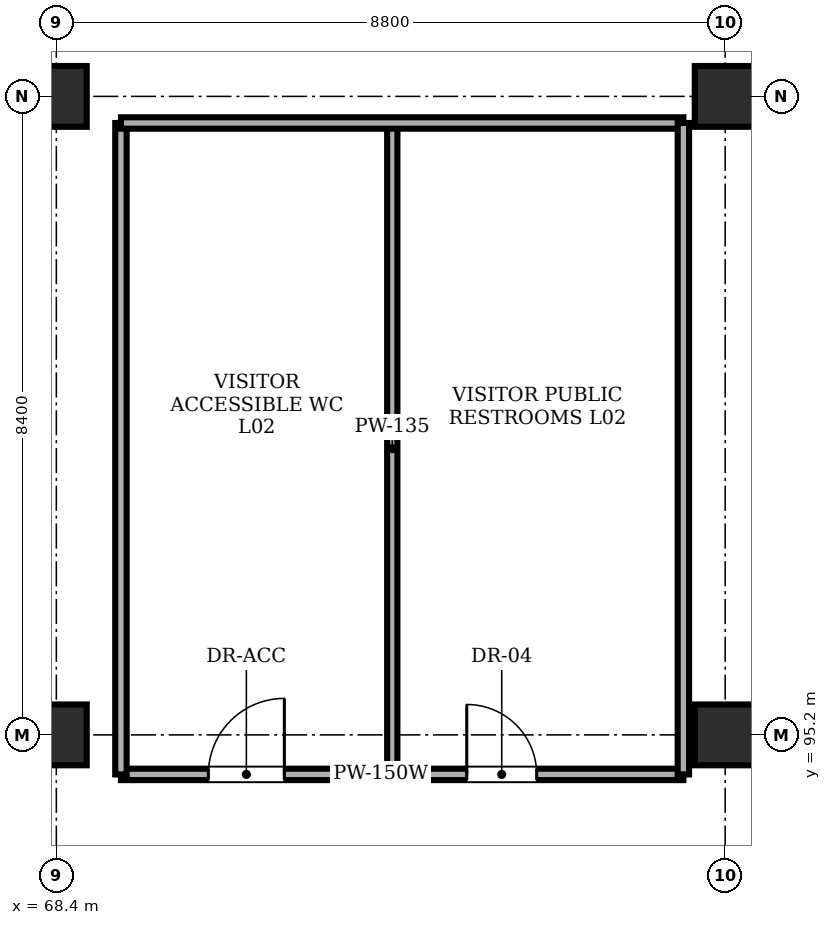
"""IFC4 building model, lengths in metres.
Left out: names, types, materials, properties, quantities, classifications, styles, units other than length and angle.
Written with IfcOpenShell. Run it as: python <this file> out.ifc"""

import sys

from ifc_helpers import new_model, si_unit, direction, frame, frame_2d, origin, origin_2d, place, context, subcontext, project, spatial, rectangle, extrude, element, fill, save


model = new_model("IFC4")
c1 = context("Model", 3, precision=1e-05, world=origin(), true_north=direction((0.0, 1.0)))
c2 = subcontext(c1, "Body", "Model", "MODEL_VIEW")
j1 = project(units=[si_unit("LENGTHUNIT", "METRE"), si_unit("PLANEANGLEUNIT", "RADIAN")], contexts=[c1])
p1 = place(None, origin())
s1 = spatial("IfcSite", under=j1, at=p1, CompositionType="ELEMENT")
p2 = place(p1, origin())
s2 = spatial("IfcBuilding", under=s1, at=p2, CompositionType="ELEMENT")
p3 = place(p2, frame((0.0, 0.0, 5.4)))
s3 = spatial("IfcBuildingStorey", under=s2, at=p3, CompositionType="ELEMENT", Elevation=5.4)
for number, where, z_axis, x_axis in (
    (1, (68.4, 95.2, 0.0), (0.0, 0.0, 1.0), (1.0, 0.0, 0.0)),
    (2, (68.4, 103.6, 0.0), (0.0, 0.0, 1.0), (1.0, 0.0, 0.0)),
    (3, (77.2, 95.2, 0.0), (0.0, 0.0, 1.0), (1.0, 0.0, 0.0)),
    (4, (77.2, 103.6, 0.0), (0.0, 0.0, 1.0), (1.0, 0.0, 0.0)),
):
    element("IfcColumn", number, at=place(p3, frame(where, z_axis=z_axis, x_axis=x_axis)), inside=s3, PredefinedType="COLUMN", context=c2, shape_type="SweptSolid", body=[
        extrude(rectangle(XDim=0.8, YDim=0.8, at=origin_2d()), origin(), (0.0, 0.0, 1.0), 4.58),
    ])
p4 = place(p3, frame((69.25, 94.68, 0.0), z_axis=(0.0, 0.0, 1.0), x_axis=(1.0, 0.0, 0.0)))
e5 = element("IfcWall", 5, at=p4, inside=s3, PredefinedType="PARTITIONING", context=c2, shape_type="SweptSolid", body=[
    extrude(rectangle(XDim=7.4, YDim=0.15, at=frame_2d((3.7, 0.0))), origin(), (0.0, 0.0, 1.0), 4.58),
])
p5 = place(p4, frame((1.15, 0.0, 0.0)))
e6 = element("IfcOpeningElement", 6, at=p5, cuts=e5, PredefinedType="OPENING", context=c2, shape_type="SweptSolid", body=[
    extrude(rectangle(XDim=1.0, YDim=2.12, at=frame_2d((0.5, 1.06))), frame((0.0, 0.085, 0.0), z_axis=(0.0, -1.0, 0.0), x_axis=(1.0, 0.0, 0.0)), (0.0, 0.0, 1.0), 0.17),
])
p6 = place(p4, frame((4.55, 0.0, 0.0)))
e7 = element("IfcOpeningElement", 7, at=p6, cuts=e5, PredefinedType="OPENING", context=c2, shape_type="SweptSolid", body=[
    extrude(rectangle(XDim=0.92, YDim=2.1, at=frame_2d((0.46, 1.05))), frame((0.0, 0.085, 0.0), z_axis=(0.0, -1.0, 0.0), x_axis=(1.0, 0.0, 0.0)), (0.0, 0.0, 1.0), 0.17),
])
p7 = place(p3, frame((69.25, 94.68, 0.0), z_axis=(0.0, 0.0, 1.0), x_axis=(0.0, 1.0, 0.0)))
e8 = element("IfcWall", 8, at=p7, inside=s3, PredefinedType="PARTITIONING", context=c2, shape_type="SweptSolid", body=[
    extrude(rectangle(XDim=8.57, YDim=0.15, at=frame_2d((4.285, 0.0))), origin(), (0.0, 0.0, 1.0), 4.58),
])
p8 = place(p3, frame((72.82, 94.68, 0.0), z_axis=(0.0, 0.0, 1.0), x_axis=(0.0, 1.0, 0.0)))
e9 = element("IfcWall", 9, at=p8, inside=s3, PredefinedType="PARTITIONING", context=c2, shape_type="SweptSolid", body=[
    extrude(rectangle(XDim=8.57, YDim=0.135, at=frame_2d((4.285, 0.0))), origin(), (0.0, 0.0, 1.0), 4.24),
])
p9 = place(p3, frame((69.25, 103.25, 0.0), z_axis=(0.0, 0.0, 1.0), x_axis=(1.0, 0.0, 0.0)))
e10 = element("IfcWall", 10, at=p9, inside=s3, PredefinedType="PARTITIONING", context=c2, shape_type="SweptSolid", body=[
    extrude(rectangle(XDim=7.4, YDim=0.15, at=frame_2d((3.7, 0.0))), origin(), (0.0, 0.0, 1.0), 4.58),
])
p10 = place(p3, frame((76.65, 94.68, 0.0), z_axis=(0.0, 0.0, 1.0), x_axis=(0.0, 1.0, 0.0)))
e11 = element("IfcWall", 11, at=p10, inside=s3, PredefinedType="PARTITIONING", context=c2, shape_type="SweptSolid", body=[
    extrude(rectangle(XDim=8.57, YDim=0.15, at=frame_2d((4.285, 0.0))), origin(), (0.0, 0.0, 1.0), 4.58),
])
p11 = place(p5, origin())
e12 = element("IfcDoor", 12, at=p11, inside=s3, OperationType="SINGLE_SWING_RIGHT", PredefinedType="DOOR", context=c2, shape_type="SweptSolid", body=[
    extrude(rectangle(XDim=1.0, YDim=2.12, at=frame_2d((0.5, 1.06))), frame((0.0, 0.025, 0.0), z_axis=(0.0, -1.0, 0.0), x_axis=(1.0, 0.0, 0.0)), (0.0, 0.0, 1.0), 0.05),
])
fill(e6, e12)
p12 = place(p6, origin())
e13 = element("IfcDoor", 13, at=p12, inside=s3, OperationType="SINGLE_SWING_LEFT", PredefinedType="DOOR", context=c2, shape_type="SweptSolid", body=[
    extrude(rectangle(XDim=0.92, YDim=2.1, at=frame_2d((0.46, 1.05))), frame((0.0, 0.025, 0.0), z_axis=(0.0, -1.0, 0.0), x_axis=(1.0, 0.0, 0.0)), (0.0, 0.0, 1.0), 0.05),
])
fill(e7, e13)
save(model, sys.argv[1])
